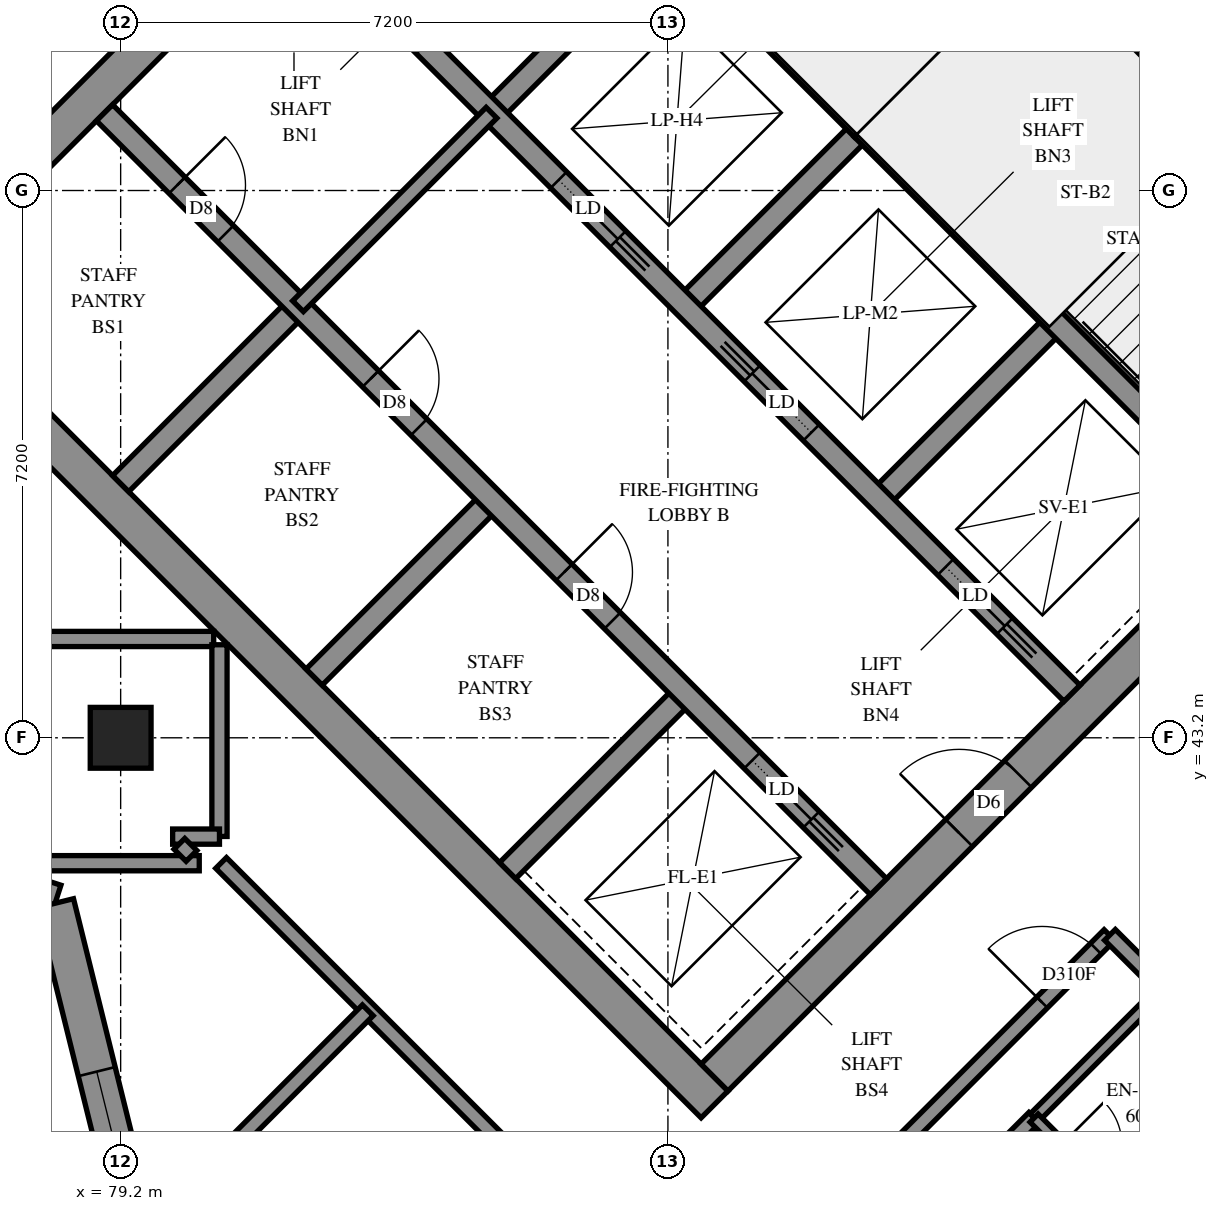
"""IFC4 building model, lengths in metres.
Left out: names, types, materials, properties, quantities, classifications, styles, units other than length and angle.
Written with IfcOpenShell. Run it as: python <this file> out.ifc"""

import sys

from ifc_helpers import new_model, si_unit, direction, frame, frame_2d, origin, origin_2d, place, context, subcontext, project, spatial, polyline, rectangle, outline, extrude, element, fill, save


model = new_model("IFC4")
c1 = context("Model", 3, precision=1e-05, world=origin(), true_north=direction((0.0, 1.0)))
c2 = subcontext(c1, "Body", "Model", "MODEL_VIEW")
j1 = project(units=[si_unit("LENGTHUNIT", "METRE"), si_unit("PLANEANGLEUNIT", "RADIAN")], contexts=[c1])
p1 = place(None, origin())
s1 = spatial("IfcSite", under=j1, at=p1, CompositionType="ELEMENT")
p2 = place(p1, origin())
s2 = spatial("IfcBuilding", under=s1, at=p2, CompositionType="ELEMENT")
p3 = place(p2, frame((0.0, 0.0, 220.2)))
s3 = spatial("IfcBuildingStorey", under=s2, at=p3, CompositionType="ELEMENT", Elevation=220.2)
p4 = place(p3, frame((79.2, 43.2, 0.0), z_axis=(0.0, 0.0, 1.0), x_axis=(1.0, 0.0, 0.0)))
e1 = element("IfcColumn", 1, at=p4, inside=s3, PredefinedType="COLUMN", context=c2, shape_type="SweptSolid", body=[
    extrude(rectangle(XDim=0.8, YDim=0.8, at=origin_2d()), origin(), (0.0, 0.0, 1.0), 3.1),
])
p5 = place(p3, frame((76.124, 49.267, -0.3), z_axis=(0.0, 0.0, 1.0), x_axis=(0.7071067812, -0.7071067812, 0.0)))
e2 = element("IfcWall", 2, at=p5, inside=s3, PredefinedType="SHEAR", context=c2, shape_type="SweptSolid", body=[
    extrude(rectangle(XDim=15.4, YDim=0.5, at=frame_2d((7.7, 0.0))), origin(), (0.0, 0.0, 1.0), 2.7),
])
p6 = place(p3, frame((86.66, 59.802, -0.3), z_axis=(0.0, 0.0, 1.0), x_axis=(0.7071067812, -0.7071067812, 0.0)))
e3 = element("IfcWall", 3, at=p6, inside=s3, PredefinedType="SHEAR", context=c2, shape_type="SweptSolid", body=[
    extrude(rectangle(XDim=15.4, YDim=0.5, at=frame_2d((7.7, 0.0))), origin(), (0.0, 0.0, 1.0), 2.7),
])
p7 = place(p6, frame((10.5, 0.0, 0.3)))
e4 = element("IfcOpeningElement", 4, at=p7, cuts=e3, PredefinedType="OPENING", context=c2, shape_type="SweptSolid", body=[
    extrude(rectangle(XDim=0.8, YDim=2.1, at=frame_2d((0.4, 1.05))), frame((0.0, 0.26, 0.0), z_axis=(0.0, -1.0, 0.0), x_axis=(1.0, 0.0, 0.0)), (0.0, 0.0, 1.0), 0.52),
])
p8 = place(p3, frame((76.478, 49.267, -0.3), z_axis=(0.0, 0.0, 1.0), x_axis=(0.7071067812, 0.7071067812, 0.0)))
e5 = element("IfcWall", 5, at=p8, inside=s3, PredefinedType="SHEAR", context=c2, shape_type="SweptSolid", body=[
    extrude(rectangle(XDim=14.4, YDim=0.5, at=frame_2d((7.2, 0.0))), origin(), (0.0, 0.0, 1.0), 2.7),
])
p9 = place(p8, frame((4.55, 0.0, 0.3)))
e6 = element("IfcOpeningElement", 6, at=p9, cuts=e5, PredefinedType="OPENING", context=c2, shape_type="SweptSolid", body=[
    extrude(rectangle(XDim=1.1, YDim=2.1, at=frame_2d((0.55, 1.05))), frame((0.0, 0.26, 0.0), z_axis=(0.0, -1.0, 0.0), x_axis=(1.0, 0.0, 0.0)), (0.0, 0.0, 1.0), 0.52),
])
p10 = place(p8, frame((11.35, 0.0, 0.3)))
e7 = element("IfcOpeningElement", 7, at=p10, cuts=e5, PredefinedType="OPENING", context=c2, shape_type="SweptSolid", body=[
    extrude(rectangle(XDim=1.1, YDim=2.1, at=frame_2d((0.55, 1.05))), frame((0.0, 0.26, 0.0), z_axis=(0.0, -1.0, 0.0), x_axis=(1.0, 0.0, 0.0)), (0.0, 0.0, 1.0), 0.52),
])
p11 = place(p3, frame((87.013, 38.731, -0.3), z_axis=(0.0, 0.0, 1.0), x_axis=(0.7071067812, 0.7071067812, 0.0)))
e8 = element("IfcWall", 8, at=p11, inside=s3, PredefinedType="SHEAR", context=c2, shape_type="SweptSolid", body=[
    extrude(rectangle(XDim=14.4, YDim=0.5, at=frame_2d((7.2, 0.0))), origin(), (0.0, 0.0, 1.0), 2.7),
])
p12 = place(p11, frame((4.55, 0.0, 0.3)))
e9 = element("IfcOpeningElement", 9, at=p12, cuts=e8, PredefinedType="OPENING", context=c2, shape_type="SweptSolid", body=[
    extrude(rectangle(XDim=1.1, YDim=2.1, at=frame_2d((0.55, 1.05))), frame((0.0, 0.26, 0.0), z_axis=(0.0, -1.0, 0.0), x_axis=(1.0, 0.0, 0.0)), (0.0, 0.0, 1.0), 0.52),
])
p13 = place(p11, frame((11.35, 0.0, 0.3)))
e10 = element("IfcOpeningElement", 10, at=p13, cuts=e8, PredefinedType="OPENING", context=c2, shape_type="SweptSolid", body=[
    extrude(rectangle(XDim=1.1, YDim=2.1, at=frame_2d((0.55, 1.05))), frame((0.0, 0.26, 0.0), z_axis=(0.0, -1.0, 0.0), x_axis=(1.0, 0.0, 0.0)), (0.0, 0.0, 1.0), 0.52),
])
for number, where, z_axis, x_axis in (
    (11, (79.2, 46.544, 0.0), (0.0, 0.0, 1.0), (0.707, 0.707, 0.0)),
    (12, (84.079, 51.423, 0.0), (0.0, 0.0, 1.0), (0.707, 0.707, 0.0)),
):
    element("IfcWall", number, at=place(p3, frame(where, z_axis=z_axis, x_axis=x_axis)), inside=s3, PredefinedType="SOLIDWALL", context=c2, shape_type="SweptSolid", body=[
        extrude(rectangle(XDim=3.3, YDim=0.3, at=frame_2d((1.65, 0.0))), origin(), (0.0, 0.0, 1.0), 3.1),
    ])
p14 = place(p3, frame((81.746, 43.999, 0.0), z_axis=(0.0, 0.0, 1.0), x_axis=(0.7071067812, 0.7071067812, 0.0)))
e13 = element("IfcWall", 13, at=p14, inside=s3, PredefinedType="SOLIDWALL", context=c2, shape_type="SweptSolid", body=[
    extrude(rectangle(XDim=3.3, YDim=0.3, at=frame_2d((1.65, 0.0))), origin(), (0.0, 0.0, 1.0), 3.1),
])
p15 = place(p3, frame((86.625, 48.878, 0.0), z_axis=(0.0, 0.0, 1.0), x_axis=(0.7071067812, 0.7071067812, 0.0)))
e14 = element("IfcWall", 14, at=p15, inside=s3, PredefinedType="SOLIDWALL", context=c2, shape_type="SweptSolid", body=[
    extrude(rectangle(XDim=3.3, YDim=0.3, at=frame_2d((1.65, 0.0))), origin(), (0.0, 0.0, 1.0), 3.1),
])
p16 = place(p3, frame((84.291, 41.453, 0.0), z_axis=(0.0, 0.0, 1.0), x_axis=(0.7071067812, 0.7071067812, 0.0)))
e15 = element("IfcWall", 15, at=p16, inside=s3, PredefinedType="SOLIDWALL", context=c2, shape_type="SweptSolid", body=[
    extrude(rectangle(XDim=3.3, YDim=0.3, at=frame_2d((1.65, 0.0))), origin(), (0.0, 0.0, 1.0), 3.1),
])
p17 = place(p3, frame((89.17, 46.332, 0.0), z_axis=(0.0, 0.0, 1.0), x_axis=(0.7071067812, 0.7071067812, 0.0)))
e16 = element("IfcWall", 16, at=p17, inside=s3, PredefinedType="SOLIDWALL", context=c2, shape_type="SweptSolid", body=[
    extrude(rectangle(XDim=3.3, YDim=0.3, at=frame_2d((1.65, 0.0))), origin(), (0.0, 0.0, 1.0), 3.1),
])
p18 = place(p3, frame((78.988, 51.423, 0.0), z_axis=(0.0, 0.0, 1.0), x_axis=(0.7071067812, -0.7071067812, 0.0)))
e17 = element("IfcWall", 17, at=p18, inside=s3, PredefinedType="SOLIDWALL", context=c2, shape_type="SweptSolid", body=[
    extrude(rectangle(XDim=14.4, YDim=0.3, at=frame_2d((7.2, 0.0))), origin(), (0.0, 0.0, 1.0), 3.1),
])
p19 = place(p18, frame((1.35, 0.0, 0.0)))
e18 = element("IfcOpeningElement", 18, at=p19, cuts=e17, PredefinedType="OPENING", context=c2, shape_type="SweptSolid", body=[
    extrude(rectangle(XDim=0.9, YDim=2.1, at=frame_2d((0.45, 1.05))), frame((0.0, 0.16, 0.0), z_axis=(0.0, -1.0, 0.0), x_axis=(1.0, 0.0, 0.0)), (0.0, 0.0, 1.0), 0.32),
])
p20 = place(p18, frame((4.95, 0.0, 0.0)))
e19 = element("IfcOpeningElement", 19, at=p20, cuts=e17, PredefinedType="OPENING", context=c2, shape_type="SweptSolid", body=[
    extrude(rectangle(XDim=0.9, YDim=2.1, at=frame_2d((0.45, 1.05))), frame((0.0, 0.16, 0.0), z_axis=(0.0, -1.0, 0.0), x_axis=(1.0, 0.0, 0.0)), (0.0, 0.0, 1.0), 0.32),
])
p21 = place(p18, frame((8.55, 0.0, 0.0)))
e20 = element("IfcOpeningElement", 20, at=p21, cuts=e17, PredefinedType="OPENING", context=c2, shape_type="SweptSolid", body=[
    extrude(rectangle(XDim=0.9, YDim=2.1, at=frame_2d((0.45, 1.05))), frame((0.0, 0.16, 0.0), z_axis=(0.0, -1.0, 0.0), x_axis=(1.0, 0.0, 0.0)), (0.0, 0.0, 1.0), 0.32),
])
p22 = place(p18, frame((12.05, 0.0, 0.0)))
e21 = element("IfcOpeningElement", 21, at=p22, cuts=e17, PredefinedType="OPENING", context=c2, shape_type="SweptSolid", body=[
    extrude(rectangle(XDim=1.1, YDim=2.1, at=frame_2d((0.55, 1.05))), frame((0.0, 0.16, 0.0), z_axis=(0.0, -1.0, 0.0), x_axis=(1.0, 0.0, 0.0)), (0.0, 0.0, 1.0), 0.32),
])
p23 = place(p3, frame((81.534, 53.969, 0.0), z_axis=(0.0, 0.0, 1.0), x_axis=(0.707103309, -0.7071102534, 0.0)))
e22 = element("IfcWall", 22, at=p23, inside=s3, PredefinedType="SOLIDWALL", context=c2, shape_type="SweptSolid", body=[
    extrude(rectangle(XDim=14.4, YDim=0.3, at=frame_2d((7.2, 0.0))), origin(), (0.0, 0.0, 1.0), 3.1),
])
p24 = place(p23, frame((1.25, 0.0, 0.0)))
e23 = element("IfcOpeningElement", 23, at=p24, cuts=e22, PredefinedType="OPENING", context=c2, shape_type="SweptSolid", body=[
    extrude(rectangle(XDim=1.1, YDim=2.1, at=frame_2d((0.55, 1.05))), frame((0.0, 0.16, 0.0), z_axis=(0.0, -1.0, 0.0), x_axis=(1.0, 0.0, 0.0)), (0.0, 0.0, 1.0), 0.32),
])
p25 = place(p23, frame((4.85, 0.0, 0.0)))
e24 = element("IfcOpeningElement", 24, at=p25, cuts=e22, PredefinedType="OPENING", context=c2, shape_type="SweptSolid", body=[
    extrude(rectangle(XDim=1.1, YDim=2.1, at=frame_2d((0.55, 1.05))), frame((0.0, 0.16, 0.0), z_axis=(0.0, -1.0, 0.0), x_axis=(1.0, 0.0, 0.0)), (0.0, 0.0, 1.0), 0.32),
])
p26 = place(p23, frame((8.45, 0.0, 0.0)))
e25 = element("IfcOpeningElement", 25, at=p26, cuts=e22, PredefinedType="OPENING", context=c2, shape_type="SweptSolid", body=[
    extrude(rectangle(XDim=1.1, YDim=2.1, at=frame_2d((0.55, 1.05))), frame((0.0, 0.16, 0.0), z_axis=(0.0, -1.0, 0.0), x_axis=(1.0, 0.0, 0.0)), (0.0, 0.0, 1.0), 0.32),
])
p27 = place(p23, frame((12.05, 0.0, 0.0)))
e26 = element("IfcOpeningElement", 26, at=p27, cuts=e22, PredefinedType="OPENING", context=c2, shape_type="SweptSolid", body=[
    extrude(rectangle(XDim=1.1, YDim=2.1, at=frame_2d((0.55, 1.05))), frame((0.0, 0.16, 0.0), z_axis=(0.0, -1.0, 0.0), x_axis=(1.0, 0.0, 0.0)), (0.0, 0.0, 1.0), 0.32),
])
for number, where, z_axis, x_axis in (
    (27, (83.867, 56.302, 0.0), (0.0, 0.0, 1.0), (0.707, -0.707, 0.0)),
    (28, (88.958, 51.211, 0.0), (0.0, 0.0, 1.0), (0.707, -0.707, 0.0)),
):
    element("IfcWall", number, at=place(p3, frame(where, z_axis=z_axis, x_axis=x_axis)), inside=s3, PredefinedType="SOLIDWALL", context=c2, shape_type="SweptSolid", body=[
        extrude(rectangle(XDim=7.2, YDim=0.3, at=frame_2d((3.6, 0.0))), origin(), (0.0, 0.0, 1.0), 3.1),
    ])
p28 = place(p3, frame((88.958, 51.211, 0.0), z_axis=(0.0, 0.0, 1.0), x_axis=(0.7071067812, 0.7071067812, 0.0)))
e29 = element("IfcWall", 29, at=p28, inside=s3, PredefinedType="SOLIDWALL", context=c2, shape_type="SweptSolid", body=[
    extrude(rectangle(XDim=4.2, YDim=0.3, at=frame_2d((2.1, 0.0))), origin(), (0.0, 0.0, 1.0), 3.1),
])
p29 = place(p3, frame((74.532, 42.256, 0.0), z_axis=(0.0, 0.0, 1.0), x_axis=(0.9512828791, -0.308319451, 0.0)))
e30 = element("IfcWall", 30, at=p29, inside=s3, PredefinedType="SOLIDWALL", context=c2, shape_type="SweptSolid", body=[
    extrude(outline(polyline([(0.06, -0.25), (3.861, -0.25), (4.139, 0.25), (-0.06, 0.25), (0.06, -0.25)])), origin(), (0.0, 0.0, 1.0), 3.1),
])
p30 = place(p3, frame((78.337, 41.023, 0.0), z_axis=(0.0, 0.0, 1.0), x_axis=(0.2402739698, -0.9707051146, 0.0)))
e31 = element("IfcWall", 31, at=p30, inside=s3, PredefinedType="SOLIDWALL", context=c2, shape_type="SweptSolid", body=[
    extrude(outline(polyline([(0.139, -0.25), (4.786, -0.25), (4.497, 0.25), (-0.139, 0.25), (0.139, -0.25)])), origin(), (0.0, 0.0, 1.0), 3.1),
])
p31 = place(p30, frame((2.281, 0.0, 0.45)))
e32 = element("IfcOpeningElement", 32, at=p31, cuts=e31, PredefinedType="OPENING", context=c2, shape_type="SweptSolid", body=[
    extrude(rectangle(XDim=1.2, YDim=2.5, at=frame_2d((0.6, 1.25))), frame((0.0, 0.26, 0.0), z_axis=(0.0, -1.0, 0.0), x_axis=(1.0, 0.0, 0.0)), (0.0, 0.0, 1.0), 0.52),
])
p32 = place(p3, frame((91.313, 53.354, 0.0), z_axis=(0.0, 0.0, 1.0), x_axis=(0.7071147811, -0.7070987812, 0.0)))
e33 = element("IfcWall", 33, at=p32, inside=s3, PredefinedType="PARTITIONING", context=c2, shape_type="SweptSolid", body=[
    extrude(rectangle(XDim=6.25, YDim=0.15, at=frame_2d((3.125, 0.0))), origin(), (0.0, 0.0, 1.0), 3.1),
])
p33 = place(p3, frame((81.534, 48.878, 0.0), z_axis=(0.0, 0.0, 1.0), x_axis=(0.707092892, 0.7071206701, 0.0)))
e34 = element("IfcWall", 34, at=p33, inside=s3, PredefinedType="PARTITIONING", context=c2, shape_type="SweptSolid", body=[
    extrude(rectangle(XDim=3.6, YDim=0.2, at=frame_2d((1.8, 0.0))), origin(), (0.0, 0.0, 1.0), 3.1),
])
p34 = place(p3, frame((85.016, 31.997, 0.0), z_axis=(0.0, 0.0, 1.0), x_axis=(0.7071067812, 0.7071067812, 0.0)))
e35 = element("IfcWall", 35, at=p34, inside=s3, PredefinedType="PARTITIONING", context=c2, shape_type="SweptSolid", body=[
    extrude(rectangle(XDim=8.773, YDim=0.2, at=frame_2d((4.387, 0.0))), origin(), (0.0, 0.0, 1.0), 3.1),
])
p35 = place(p3, frame((86.835, 35.231, 0.0), z_axis=(0.0, 0.0, 1.0), x_axis=(0.7071067812, 0.7071067812, 0.0)))
e36 = element("IfcWall", 36, at=p35, inside=s3, PredefinedType="PARTITIONING", context=c2, shape_type="SweptSolid", body=[
    extrude(rectangle(XDim=7.6, YDim=0.2, at=frame_2d((3.8, 0.0))), origin(), (0.0, 0.0, 1.0), 3.1),
])
p36 = place(p35, frame((6.346, 0.0, 0.0)))
e37 = element("IfcOpeningElement", 37, at=p36, cuts=e36, PredefinedType="OPENING", context=c2, shape_type="SweptSolid", body=[
    extrude(rectangle(XDim=1.0, YDim=2.1, at=frame_2d((0.5, 1.05))), frame((0.0, 0.11, 0.0), z_axis=(0.0, -1.0, 0.0), x_axis=(1.0, 0.0, 0.0)), (0.0, 0.0, 1.0), 0.22),
])
p37 = place(p3, frame((80.522, 41.553, 0.0), z_axis=(0.0, 0.0, 1.0), x_axis=(0.7071067812, -0.7071067812, 0.0)))
e38 = element("IfcWall", 38, at=p37, inside=s3, PredefinedType="PARTITIONING", context=c2, shape_type="SweptSolid", body=[
    extrude(rectangle(XDim=6.836, YDim=0.2, at=frame_2d((3.418, 0.0))), origin(), (0.0, 0.0, 1.0), 3.1),
])
p38 = place(p3, frame((92.216, 40.608, 0.0), z_axis=(0.0, 0.0, 1.0), x_axis=(0.7071067812, -0.7071067812, 0.0)))
e39 = element("IfcWall", 39, at=p38, inside=s3, PredefinedType="PARTITIONING", context=c2, shape_type="SweptSolid", body=[
    extrude(rectangle(XDim=4.599, YDim=0.2, at=frame_2d((2.3, 0.0))), origin(), (0.0, 0.0, 1.0), 3.1),
])
p39 = place(p38, frame((3.189, 0.0, 0.0)))
e40 = element("IfcOpeningElement", 40, at=p39, cuts=e39, PredefinedType="OPENING", context=c2, shape_type="SweptSolid", body=[
    extrude(rectangle(XDim=0.9, YDim=2.1, at=frame_2d((0.45, 1.05))), frame((0.0, 0.11, 0.0), z_axis=(0.0, -1.0, 0.0), x_axis=(1.0, 0.0, 0.0)), (0.0, 0.0, 1.0), 0.22),
])
p40 = place(p3, frame((79.639, 36.803, 0.0), z_axis=(0.0, 0.0, 1.0), x_axis=(0.7071067812, 0.7071067812, 0.0)))
e41 = element("IfcWall", 41, at=p40, inside=s3, PredefinedType="PARTITIONING", context=c2, shape_type="SweptSolid", body=[
    extrude(rectangle(XDim=3.977, YDim=0.2, at=frame_2d((1.988, 0.0))), origin(), (0.0, 0.0, 1.0), 3.1),
])
p41 = place(p3, frame((77.572, 41.55, 0.0), z_axis=(0.0, 0.0, 1.0), x_axis=(1.0, 0.0, 0.0)))
e42 = element("IfcWall", 42, at=p41, inside=s3, PredefinedType="PARTITIONING", context=c2, shape_type="SweptSolid", body=[
    extrude(rectangle(XDim=2.662, YDim=0.2, at=frame_2d((1.331, 0.0))), origin(), (0.0, 0.0, 1.0), 3.1),
])
for number, where, z_axis, x_axis in (
    (43, (77.902, 44.5, 0.0), (0.0, 0.0, 1.0), (1.0, 0.0, 0.0)),
    (44, (80.5, 41.902, 0.0), (0.0, 0.0, 1.0), (0.0, 1.0, 0.0)),
):
    element("IfcWall", number, at=place(p3, frame(where, z_axis=z_axis, x_axis=x_axis)), inside=s3, PredefinedType="PARTITIONING", context=c2, shape_type="SweptSolid", body=[
        extrude(rectangle(XDim=2.522, YDim=0.2, at=frame_2d((1.261, 0.0))), origin(), (0.0, 0.0, 1.0), 3.1),
    ])
for number, where, z_axis, x_axis in (
    (45, (92.563, 36.857, 0.0), (0.0, 0.0, 1.0), (0.707, 0.707, 0.0)),
    (46, (91.219, 38.201, 0.0), (0.0, 0.0, 1.0), (0.707, 0.707, 0.0)),
):
    element("IfcWall", number, at=place(p3, frame(where, z_axis=z_axis, x_axis=x_axis)), inside=s3, PredefinedType="PARTITIONING", context=c2, shape_type="SweptSolid", body=[
        extrude(rectangle(XDim=2.401, YDim=0.15, at=frame_2d((1.201, 0.0))), origin(), (0.0, 0.0, 1.0), 3.1),
    ])
p42 = place(p3, frame((91.217, 38.197, 0.0), z_axis=(0.0, 0.0, 1.0), x_axis=(0.7071067812, -0.7071067812, 0.0)))
e47 = element("IfcWall", 47, at=p42, inside=s3, PredefinedType="PARTITIONING", context=c2, shape_type="SweptSolid", body=[
    extrude(rectangle(XDim=1.901, YDim=0.15, at=frame_2d((0.95, 0.0))), origin(), (0.0, 0.0, 1.0), 3.1),
])
p43 = place(p42, frame((0.502, 0.0, 0.0)))
e48 = element("IfcOpeningElement", 48, at=p43, cuts=e47, PredefinedType="OPENING", context=c2, shape_type="SweptSolid", body=[
    extrude(rectangle(XDim=0.8, YDim=2.1, at=frame_2d((0.4, 1.05))), frame((0.0, 0.085, 0.0), z_axis=(0.0, -1.0, 0.0), x_axis=(1.0, 0.0, 0.0)), (0.0, 0.0, 1.0), 0.17),
])
p44 = place(p3, frame((79.884, 41.9, 0.0), z_axis=(0.0, 0.0, 1.0), x_axis=(1.0, 0.0, 0.0)))
e49 = element("IfcWall", 49, at=p44, inside=s3, PredefinedType="PARTITIONING", context=c2, shape_type="SweptSolid", body=[
    extrude(rectangle(XDim=0.616, YDim=0.2, at=frame_2d((0.308, 0.0))), origin(), (0.0, 0.0, 1.0), 3.1),
])
p45 = place(p3, frame((79.973, 41.805, 0.0), z_axis=(0.0, 0.0, 1.0), x_axis=(0.707329037, -0.7068844555, 0.0)))
e50 = element("IfcWall", 50, at=p45, inside=s3, PredefinedType="PARTITIONING", context=c2, shape_type="SweptSolid", body=[
    extrude(rectangle(XDim=0.225, YDim=0.2, at=frame_2d((0.112, 0.0))), origin(), (0.0, 0.0, 1.0), 3.1),
])
p46 = place(p31, origin())
e51 = element("IfcWindow", 51, at=p46, inside=s3, PartitioningType="SINGLE_PANEL", PredefinedType="WINDOW", context=c2, shape_type="SweptSolid", body=[
    extrude(rectangle(XDim=1.2, YDim=2.5, at=frame_2d((0.6, 1.25))), frame((0.0, 0.18, 0.0), z_axis=(0.0, -1.0, 0.0), x_axis=(1.0, 0.0, 0.0)), (0.0, 0.0, 1.0), 0.06),
])
fill(e32, e51)
p47 = place(p12, origin())
e52 = element("IfcDoor", 52, at=p47, inside=s3, OperationType="DOUBLE_DOOR_SINGLE_SWING", PredefinedType="DOOR", context=c2, shape_type="SweptSolid", body=[
    extrude(rectangle(XDim=1.1, YDim=2.1, at=frame_2d((0.55, 1.05))), frame((0.0, 0.025, 0.0), z_axis=(0.0, -1.0, 0.0), x_axis=(1.0, 0.0, 0.0)), (0.0, 0.0, 1.0), 0.05),
])
fill(e9, e52)
p48 = place(p19, origin())
e53 = element("IfcDoor", 53, at=p48, inside=s3, OperationType="SINGLE_SWING_LEFT", PredefinedType="DOOR", context=c2, shape_type="SweptSolid", body=[
    extrude(rectangle(XDim=0.9, YDim=2.1, at=frame_2d((0.45, 1.05))), frame((0.0, 0.025, 0.0), z_axis=(0.0, -1.0, 0.0), x_axis=(1.0, 0.0, 0.0)), (0.0, 0.0, 1.0), 0.05),
])
fill(e18, e53)
p49 = place(p20, origin())
e54 = element("IfcDoor", 54, at=p49, inside=s3, OperationType="SINGLE_SWING_LEFT", PredefinedType="DOOR", context=c2, shape_type="SweptSolid", body=[
    extrude(rectangle(XDim=0.9, YDim=2.1, at=frame_2d((0.45, 1.05))), frame((0.0, 0.025, 0.0), z_axis=(0.0, -1.0, 0.0), x_axis=(1.0, 0.0, 0.0)), (0.0, 0.0, 1.0), 0.05),
])
fill(e19, e54)
p50 = place(p21, origin())
e55 = element("IfcDoor", 55, at=p50, inside=s3, OperationType="SINGLE_SWING_LEFT", PredefinedType="DOOR", context=c2, shape_type="SweptSolid", body=[
    extrude(rectangle(XDim=0.9, YDim=2.1, at=frame_2d((0.45, 1.05))), frame((0.0, 0.025, 0.0), z_axis=(0.0, -1.0, 0.0), x_axis=(1.0, 0.0, 0.0)), (0.0, 0.0, 1.0), 0.05),
])
fill(e20, e55)
p51 = place(p22, origin())
e56 = element("IfcDoor", 56, at=p51, inside=s3, OperationType="SLIDING_TO_RIGHT", PredefinedType="DOOR", context=c2, shape_type="SweptSolid", body=[
    extrude(rectangle(XDim=1.1, YDim=2.1, at=frame_2d((0.55, 1.05))), frame((0.0, 0.025, 0.0), z_axis=(0.0, -1.0, 0.0), x_axis=(1.0, 0.0, 0.0)), (0.0, 0.0, 1.0), 0.05),
])
fill(e21, e56)
p52 = place(p25, origin())
e57 = element("IfcDoor", 57, at=p52, inside=s3, OperationType="SLIDING_TO_RIGHT", PredefinedType="DOOR", context=c2, shape_type="SweptSolid", body=[
    extrude(rectangle(XDim=1.1, YDim=2.1, at=frame_2d((0.55, 1.05))), frame((0.0, 0.025, 0.0), z_axis=(0.0, -1.0, 0.0), x_axis=(1.0, 0.0, 0.0)), (0.0, 0.0, 1.0), 0.05),
])
fill(e24, e57)
p53 = place(p26, origin())
e58 = element("IfcDoor", 58, at=p53, inside=s3, OperationType="SLIDING_TO_LEFT", PredefinedType="DOOR", context=c2, shape_type="SweptSolid", body=[
    extrude(rectangle(XDim=1.1, YDim=2.1, at=frame_2d((0.55, 1.05))), frame((0.0, 0.025, 0.0), z_axis=(0.0, -1.0, 0.0), x_axis=(1.0, 0.0, 0.0)), (0.0, 0.0, 1.0), 0.05),
])
fill(e25, e58)
p54 = place(p27, origin())
e59 = element("IfcDoor", 59, at=p54, inside=s3, OperationType="SLIDING_TO_RIGHT", PredefinedType="DOOR", context=c2, shape_type="SweptSolid", body=[
    extrude(rectangle(XDim=1.1, YDim=2.1, at=frame_2d((0.55, 1.05))), frame((0.0, 0.025, 0.0), z_axis=(0.0, -1.0, 0.0), x_axis=(1.0, 0.0, 0.0)), (0.0, 0.0, 1.0), 0.05),
])
fill(e26, e59)
p55 = place(p36, origin())
e60 = element("IfcDoor", 60, at=p55, inside=s3, OperationType="SINGLE_SWING_RIGHT", PredefinedType="DOOR", context=c2, shape_type="SweptSolid", body=[
    extrude(rectangle(XDim=1.0, YDim=2.1, at=frame_2d((0.5, 1.05))), frame((0.0, 0.025, 0.0), z_axis=(0.0, -1.0, 0.0), x_axis=(1.0, 0.0, 0.0)), (0.0, 0.0, 1.0), 0.05),
])
fill(e37, e60)
save(model, sys.argv[1])
